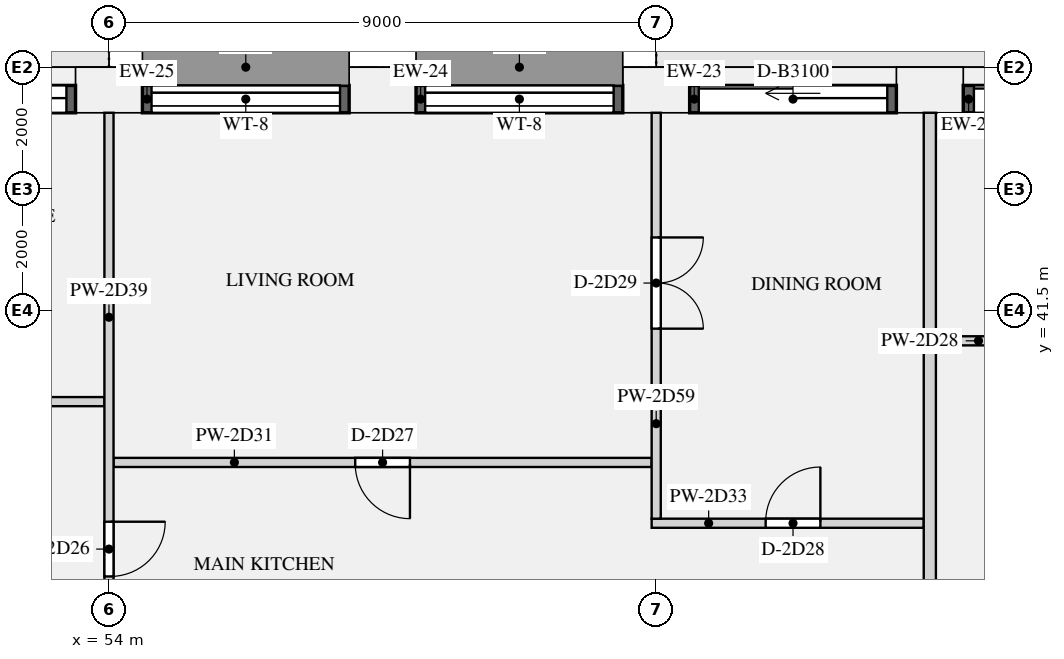
"""IFC4 building model, lengths in metres.
Left out: names, types, materials, properties, quantities, classifications, styles, units other than length and angle.
Written with IfcOpenShell. Run it as: python <this file> out.ifc"""

import sys

from ifc_helpers import new_model, si_unit, direction, frame, frame_2d, origin, origin_2d, place, context, subcontext, project, spatial, rectangle, extrude, element, fill, save


model = new_model("IFC4")
c1 = context("Model", 3, precision=1e-05, world=origin(), true_north=direction((0.0, 1.0)))
c2 = subcontext(c1, "Body", "Model", "MODEL_VIEW")
j1 = project(units=[si_unit("LENGTHUNIT", "METRE"), si_unit("PLANEANGLEUNIT", "RADIAN")], contexts=[c1])
p1 = place(None, origin())
s1 = spatial("IfcSite", under=j1, at=p1, CompositionType="ELEMENT")
p2 = place(p1, origin())
s2 = spatial("IfcBuilding", under=s1, at=p2, CompositionType="ELEMENT")
p3 = place(p2, frame((0.0, 0.0, 111.9)))
s3 = spatial("IfcBuildingStorey", under=s2, at=p3, CompositionType="ELEMENT", Elevation=111.9)
for number, where, z_axis, x_axis in (
    (1, (67.5, 45.125, 0.0), (0.0, 0.0, 1.0), (-1.0, 0.0, 0.0)),
    (2, (63.0, 45.125, 0.0), (0.0, 0.0, 1.0), (-1.0, 0.0, 0.0)),
    (3, (58.5, 45.125, 0.0), (0.0, 0.0, 1.0), (-1.0, 0.0, 0.0)),
    (4, (54.0, 45.125, 0.0), (0.0, 0.0, 1.0), (-1.0, 0.0, 0.0)),
):
    element("IfcColumn", number, at=place(p3, frame(where, z_axis=z_axis, x_axis=x_axis)), inside=s3, PredefinedType="USERDEFINED", context=c2, shape_type="SweptSolid", body=[
        extrude(rectangle(XDim=1.1, YDim=0.75, at=origin_2d()), origin(), (0.0, 0.0, 1.0), 3.15),
    ])
p4 = place(p3, frame((70.9, 44.975, 0.0), z_axis=(0.0, 0.0, 1.0), x_axis=(-1.0, 0.0, 0.0)))
e5 = element("IfcWall", 5, at=p4, inside=s3, PredefinedType="SOLIDWALL", context=c2, shape_type="SweptSolid", body=[
    extrude(rectangle(XDim=2.85, YDim=0.45, at=frame_2d((1.425, 0.0))), origin(), (0.0, 0.0, 1.0), 2.83),
])
p5 = place(p4, frame((0.175, 0.0, 0.0)))
e6 = element("IfcOpeningElement", 6, at=p5, cuts=e5, PredefinedType="OPENING", context=c2, shape_type="SweptSolid", body=[
    extrude(rectangle(XDim=2.5, YDim=2.3, at=frame_2d((1.25, 1.15))), frame((0.0, 0.235, 0.0), z_axis=(0.0, -1.0, 0.0), x_axis=(1.0, 0.0, 0.0)), (0.0, 0.0, 1.0), 0.47),
])
p6 = place(p3, frame((66.95, 44.975, 0.0), z_axis=(0.0, 0.0, 1.0), x_axis=(-1.0, 0.0, 0.0)))
e7 = element("IfcWall", 7, at=p6, inside=s3, PredefinedType="SOLIDWALL", context=c2, shape_type="SweptSolid", body=[
    extrude(rectangle(XDim=3.4, YDim=0.45, at=frame_2d((1.7, 0.0))), origin(), (0.0, 0.0, 1.0), 2.83),
])
p7 = place(p6, frame((0.15, 0.0, 0.0)))
e8 = element("IfcOpeningElement", 8, at=p7, cuts=e7, PredefinedType="OPENING", context=c2, shape_type="SweptSolid", body=[
    extrude(rectangle(XDim=3.1, YDim=2.3, at=frame_2d((1.55, 1.15))), frame((0.0, 0.235, 0.0), z_axis=(0.0, -1.0, 0.0), x_axis=(1.0, 0.0, 0.0)), (0.0, 0.0, 1.0), 0.47),
])
p8 = place(p3, frame((62.45, 44.975, 0.9), z_axis=(0.0, 0.0, 1.0), x_axis=(-1.0, 0.0, 0.0)))
e9 = element("IfcWall", 9, at=p8, inside=s3, PredefinedType="SOLIDWALL", context=c2, shape_type="SweptSolid", body=[
    extrude(rectangle(XDim=3.4, YDim=0.45, at=frame_2d((1.7, 0.0))), origin(), (0.0, 0.0, 1.0), 1.93),
])
p9 = place(p8, frame((0.15, 0.0, 0.15)))
e10 = element("IfcOpeningElement", 10, at=p9, cuts=e9, PredefinedType="OPENING", context=c2, shape_type="SweptSolid", body=[
    extrude(rectangle(XDim=3.1, YDim=1.5, at=frame_2d((1.55, 0.75))), frame((0.0, 0.235, 0.0), z_axis=(0.0, -1.0, 0.0), x_axis=(1.0, 0.0, 0.0)), (0.0, 0.0, 1.0), 0.47),
])
p10 = place(p3, frame((57.95, 44.975, 0.9), z_axis=(0.0, 0.0, 1.0), x_axis=(-1.0, 0.0, 0.0)))
e11 = element("IfcWall", 11, at=p10, inside=s3, PredefinedType="SOLIDWALL", context=c2, shape_type="SweptSolid", body=[
    extrude(rectangle(XDim=3.4, YDim=0.45, at=frame_2d((1.7, 0.0))), origin(), (0.0, 0.0, 1.0), 1.93),
])
p11 = place(p10, frame((0.15, 0.0, 0.15)))
e12 = element("IfcOpeningElement", 12, at=p11, cuts=e11, PredefinedType="OPENING", context=c2, shape_type="SweptSolid", body=[
    extrude(rectangle(XDim=3.1, YDim=1.5, at=frame_2d((1.55, 0.75))), frame((0.0, 0.235, 0.0), z_axis=(0.0, -1.0, 0.0), x_axis=(1.0, 0.0, 0.0)), (0.0, 0.0, 1.0), 0.47),
])
p12 = place(p3, frame((53.45, 44.975, 0.0), z_axis=(0.0, 0.0, 1.0), x_axis=(-1.0, 0.0, 0.0)))
e13 = element("IfcWall", 13, at=p12, inside=s3, PredefinedType="SOLIDWALL", context=c2, shape_type="SweptSolid", body=[
    extrude(rectangle(XDim=3.4, YDim=0.45, at=frame_2d((1.7, 0.0))), origin(), (0.0, 0.0, 1.0), 2.83),
])
p13 = place(p12, frame((0.15, 0.0, 0.0)))
e14 = element("IfcOpeningElement", 14, at=p13, cuts=e13, PredefinedType="OPENING", context=c2, shape_type="SweptSolid", body=[
    extrude(rectangle(XDim=3.1, YDim=2.3, at=frame_2d((1.55, 1.15))), frame((0.0, 0.235, 0.0), z_axis=(0.0, -1.0, 0.0), x_axis=(1.0, 0.0, 0.0)), (0.0, 0.0, 1.0), 0.47),
])
p14 = place(p3, frame((67.6, 41.0, 0.0), z_axis=(0.0, 0.0, 1.0), x_axis=(1.0, 0.0, 0.0)))
e15 = element("IfcWall", 15, at=p14, inside=s3, PredefinedType="PARTITIONING", context=c2, shape_type="SweptSolid", body=[
    extrude(rectangle(XDim=3.65, YDim=0.15, at=frame_2d((1.825, 0.0))), origin(), (0.0, 0.0, 1.0), 2.83),
])
p15 = place(p14, frame((1.4, 0.0, 0.0)))
e16 = element("IfcOpeningElement", 16, at=p15, cuts=e15, PredefinedType="OPENING", context=c2, shape_type="SweptSolid", body=[
    extrude(rectangle(XDim=0.9, YDim=2.1, at=frame_2d((0.45, 1.05))), frame((0.0, 0.085, 0.0), z_axis=(0.0, -1.0, 0.0), x_axis=(1.0, 0.0, 0.0)), (0.0, 0.0, 1.0), 0.17),
])
p16 = place(p3, frame((54.075, 39.0, 0.0), z_axis=(0.0, 0.0, 1.0), x_axis=(1.0, 0.0, 0.0)))
e17 = element("IfcWall", 17, at=p16, inside=s3, PredefinedType="PARTITIONING", context=c2, shape_type="SweptSolid", body=[
    extrude(rectangle(XDim=8.85, YDim=0.15, at=frame_2d((4.425, 0.0))), origin(), (0.0, 0.0, 1.0), 2.83),
])
p17 = place(p16, frame((3.975, 0.0, 0.0)))
e18 = element("IfcOpeningElement", 18, at=p17, cuts=e17, PredefinedType="OPENING", context=c2, shape_type="SweptSolid", body=[
    extrude(rectangle(XDim=0.9, YDim=2.1, at=frame_2d((0.45, 1.05))), frame((0.0, 0.085, 0.0), z_axis=(0.0, -1.0, 0.0), x_axis=(1.0, 0.0, 0.0)), (0.0, 0.0, 1.0), 0.17),
])
p18 = place(p3, frame((49.575, 40.0, 0.0), z_axis=(0.0, 0.0, 1.0), x_axis=(1.0, 0.0, 0.0)))
e19 = element("IfcWall", 19, at=p18, inside=s3, PredefinedType="PARTITIONING", context=c2, shape_type="SweptSolid", body=[
    extrude(rectangle(XDim=4.35, YDim=0.15, at=frame_2d((2.175, 0.0))), origin(), (0.0, 0.0, 1.0), 2.83),
])
p19 = place(p18, frame((1.725, 0.0, 0.0)))
e20 = element("IfcOpeningElement", 20, at=p19, cuts=e19, PredefinedType="OPENING", context=c2, shape_type="SweptSolid", body=[
    extrude(rectangle(XDim=0.9, YDim=2.1, at=frame_2d((0.45, 1.05))), frame((0.0, 0.085, 0.0), z_axis=(0.0, -1.0, 0.0), x_axis=(1.0, 0.0, 0.0)), (0.0, 0.0, 1.0), 0.17),
])
p20 = place(p3, frame((62.925, 38.0, 0.0), z_axis=(0.0, 0.0, 1.0), x_axis=(1.0, 0.0, 0.0)))
e21 = element("IfcWall", 21, at=p20, inside=s3, PredefinedType="PARTITIONING", context=c2, shape_type="SweptSolid", body=[
    extrude(rectangle(XDim=4.475, YDim=0.15, at=frame_2d((2.237, 0.0))), origin(), (0.0, 0.0, 1.0), 2.83),
])
p21 = place(p20, frame((1.875, 0.0, 0.0)))
e22 = element("IfcOpeningElement", 22, at=p21, cuts=e21, PredefinedType="OPENING", context=c2, shape_type="SweptSolid", body=[
    extrude(rectangle(XDim=0.9, YDim=2.1, at=frame_2d((0.45, 1.05))), frame((0.0, 0.085, 0.0), z_axis=(0.0, -1.0, 0.0), x_axis=(1.0, 0.0, 0.0)), (0.0, 0.0, 1.0), 0.17),
])
p22 = place(p3, frame((54.0, 35.475, 0.0), z_axis=(0.0, 0.0, 1.0), x_axis=(0.0, 1.0, 0.0)))
e23 = element("IfcWall", 23, at=p22, inside=s3, PredefinedType="PARTITIONING", context=c2, shape_type="SweptSolid", body=[
    extrude(rectangle(XDim=9.275, YDim=0.15, at=frame_2d((4.637, 0.0))), origin(), (0.0, 0.0, 1.0), 2.83),
])
p23 = place(p22, frame((1.65, 0.0, 0.0)))
e24 = element("IfcOpeningElement", 24, at=p23, cuts=e23, PredefinedType="OPENING", context=c2, shape_type="SweptSolid", body=[
    extrude(rectangle(XDim=0.9, YDim=2.1, at=frame_2d((0.45, 1.05))), frame((0.0, 0.085, 0.0), z_axis=(0.0, -1.0, 0.0), x_axis=(1.0, 0.0, 0.0)), (0.0, 0.0, 1.0), 0.17),
])
p24 = place(p3, frame((63.0, 38.075, 0.0), z_axis=(0.0, 0.0, 1.0), x_axis=(0.0, 1.0, 0.0)))
e25 = element("IfcWall", 25, at=p24, inside=s3, PredefinedType="PARTITIONING", context=c2, shape_type="SweptSolid", body=[
    extrude(rectangle(XDim=6.675, YDim=0.15, at=frame_2d((3.337, 0.0))), origin(), (0.0, 0.0, 1.0), 2.83),
])
p25 = place(p24, frame((3.125, 0.0, 0.0)))
e26 = element("IfcOpeningElement", 26, at=p25, cuts=e25, PredefinedType="OPENING", context=c2, shape_type="SweptSolid", body=[
    extrude(rectangle(XDim=1.5, YDim=2.1, at=frame_2d((0.75, 1.05))), frame((0.0, 0.085, 0.0), z_axis=(0.0, -1.0, 0.0), x_axis=(1.0, 0.0, 0.0)), (0.0, 0.0, 1.0), 0.17),
])
p26 = place(p3, frame((67.5, 24.575, 0.0), z_axis=(0.0, 0.0, 1.0), x_axis=(0.0, 1.0, 0.0)))
e27 = element("IfcWall", 27, at=p26, inside=s3, PredefinedType="PARTITIONING", context=c2, shape_type="SweptSolid", body=[
    extrude(rectangle(XDim=20.175, YDim=0.2, at=frame_2d((10.087, 0.0))), origin(), (0.0, 0.0, 1.0), 2.83),
])
p27 = place(p5, origin())
e28 = element("IfcDoor", 28, at=p27, inside=s3, OperationType="SLIDING_TO_LEFT", PredefinedType="DOOR", context=c2, shape_type="SweptSolid", body=[
    extrude(rectangle(XDim=2.5, YDim=2.3, at=frame_2d((1.25, 1.15))), frame((0.0, -0.07, 0.0), z_axis=(0.0, -1.0, 0.0), x_axis=(1.0, 0.0, 0.0)), (0.0, 0.0, 1.0), 0.05),
])
fill(e6, e28)
p28 = place(p7, origin())
e29 = element("IfcDoor", 29, at=p28, inside=s3, OperationType="SLIDING_TO_LEFT", PredefinedType="DOOR", context=c2, shape_type="SweptSolid", body=[
    extrude(rectangle(XDim=3.1, YDim=2.3, at=frame_2d((1.55, 1.15))), frame((0.0, -0.07, 0.0), z_axis=(0.0, -1.0, 0.0), x_axis=(1.0, 0.0, 0.0)), (0.0, 0.0, 1.0), 0.05),
])
fill(e8, e29)
p29 = place(p9, origin())
e30 = element("IfcWindow", 30, at=p29, inside=s3, PartitioningType="SINGLE_PANEL", PredefinedType="WINDOW", context=c2, shape_type="SweptSolid", body=[
    extrude(rectangle(XDim=3.1, YDim=1.5, at=frame_2d((1.55, 0.75))), frame((0.0, -0.065, 0.0), z_axis=(0.0, -1.0, 0.0), x_axis=(1.0, 0.0, 0.0)), (0.0, 0.0, 1.0), 0.06),
])
fill(e10, e30)
p30 = place(p11, origin())
e31 = element("IfcWindow", 31, at=p30, inside=s3, PartitioningType="SINGLE_PANEL", PredefinedType="WINDOW", context=c2, shape_type="SweptSolid", body=[
    extrude(rectangle(XDim=3.1, YDim=1.5, at=frame_2d((1.55, 0.75))), frame((0.0, -0.065, 0.0), z_axis=(0.0, -1.0, 0.0), x_axis=(1.0, 0.0, 0.0)), (0.0, 0.0, 1.0), 0.06),
])
fill(e12, e31)
p31 = place(p13, origin())
e32 = element("IfcDoor", 32, at=p31, inside=s3, OperationType="SLIDING_TO_LEFT", PredefinedType="DOOR", context=c2, shape_type="SweptSolid", body=[
    extrude(rectangle(XDim=3.1, YDim=2.3, at=frame_2d((1.55, 1.15))), frame((0.0, -0.07, 0.0), z_axis=(0.0, -1.0, 0.0), x_axis=(1.0, 0.0, 0.0)), (0.0, 0.0, 1.0), 0.05),
])
fill(e14, e32)
p32 = place(p23, frame((0.9, 0.0, 0.0), z_axis=(0.0, 0.0, 1.0), x_axis=(-1.0, 0.0, 0.0)))
e33 = element("IfcDoor", 33, at=p32, inside=s3, OperationType="SINGLE_SWING_LEFT", PredefinedType="DOOR", context=c2, shape_type="SweptSolid", body=[
    extrude(rectangle(XDim=0.9, YDim=2.1, at=frame_2d((0.45, 1.05))), frame((0.0, 0.025, 0.0), z_axis=(0.0, -1.0, 0.0), x_axis=(1.0, 0.0, 0.0)), (0.0, 0.0, 1.0), 0.05),
])
fill(e24, e33)
p33 = place(p17, frame((0.9, 0.0, 0.0), z_axis=(0.0, 0.0, 1.0), x_axis=(-1.0, 0.0, 0.0)))
e34 = element("IfcDoor", 34, at=p33, inside=s3, OperationType="SINGLE_SWING_LEFT", PredefinedType="DOOR", context=c2, shape_type="SweptSolid", body=[
    extrude(rectangle(XDim=0.9, YDim=2.1, at=frame_2d((0.45, 1.05))), frame((0.0, 0.025, 0.0), z_axis=(0.0, -1.0, 0.0), x_axis=(1.0, 0.0, 0.0)), (0.0, 0.0, 1.0), 0.05),
])
fill(e18, e34)
p34 = place(p21, origin())
e35 = element("IfcDoor", 35, at=p34, inside=s3, OperationType="SINGLE_SWING_RIGHT", PredefinedType="DOOR", context=c2, shape_type="SweptSolid", body=[
    extrude(rectangle(XDim=0.9, YDim=2.1, at=frame_2d((0.45, 1.05))), frame((0.0, 0.025, 0.0), z_axis=(0.0, -1.0, 0.0), x_axis=(1.0, 0.0, 0.0)), (0.0, 0.0, 1.0), 0.05),
])
fill(e22, e35)
p35 = place(p25, frame((1.5, 0.0, 0.0), z_axis=(0.0, 0.0, 1.0), x_axis=(-1.0, 0.0, 0.0)))
e36 = element("IfcDoor", 36, at=p35, inside=s3, OperationType="DOUBLE_DOOR_SINGLE_SWING", PredefinedType="DOOR", context=c2, shape_type="SweptSolid", body=[
    extrude(rectangle(XDim=1.5, YDim=2.1, at=frame_2d((0.75, 1.05))), frame((0.0, 0.025, 0.0), z_axis=(0.0, -1.0, 0.0), x_axis=(1.0, 0.0, 0.0)), (0.0, 0.0, 1.0), 0.05),
])
fill(e26, e36)
save(model, sys.argv[1])
